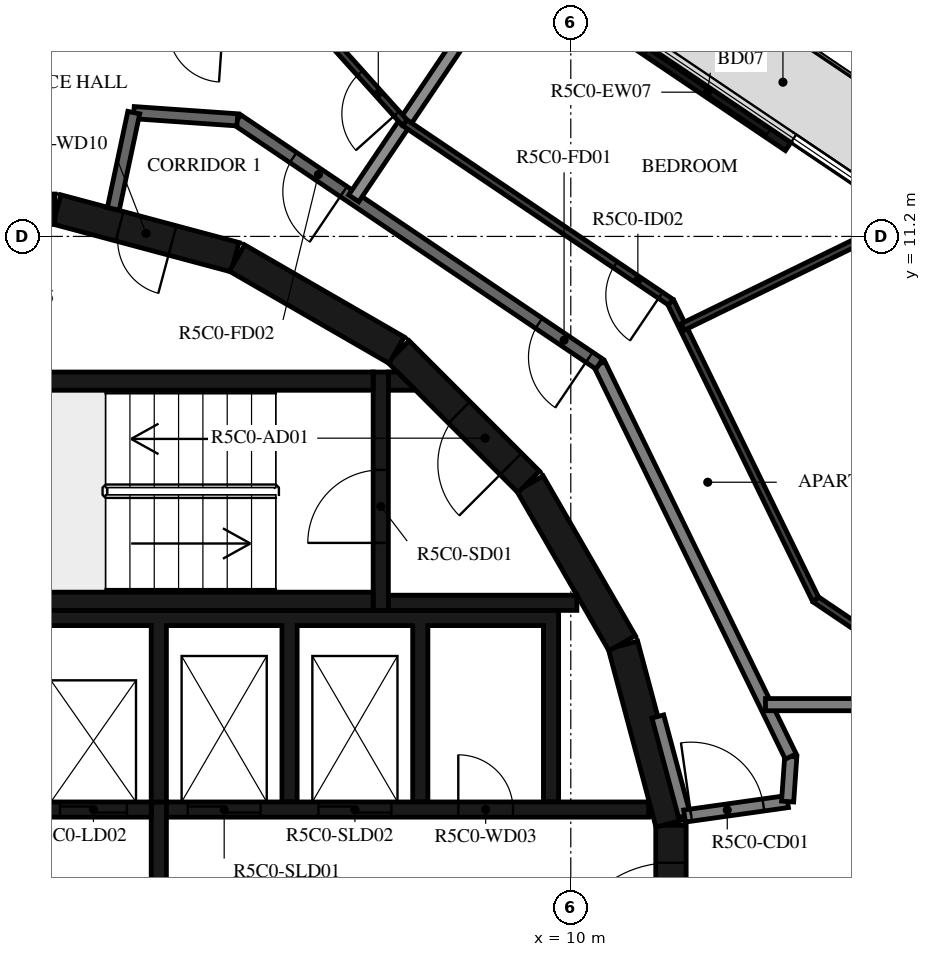
"""IFC4 building model, lengths in metres.
Left out: names, types, materials, properties, quantities, classifications, styles, units other than length and angle.
Written with IfcOpenShell. Run it as: python <this file> out.ifc"""

import sys

from ifc_helpers import new_model, si_unit, direction, frame, frame_2d, origin, place, context, subcontext, project, spatial, polyline, rectangle, outline, extrude, element, fill, save


model = new_model("IFC4")
c1 = context("Model", 3, precision=1e-05, world=origin(), true_north=direction((0.0, 1.0)))
c2 = subcontext(c1, "Body", "Model", "MODEL_VIEW")
j1 = project(units=[si_unit("LENGTHUNIT", "METRE"), si_unit("PLANEANGLEUNIT", "RADIAN")], contexts=[c1])
p1 = place(None, origin())
s1 = spatial("IfcSite", under=j1, at=p1, CompositionType="ELEMENT")
p2 = place(p1, origin())
s2 = spatial("IfcBuilding", under=s1, at=p2, CompositionType="ELEMENT")
p3 = place(p2, frame((0.0, 0.0, 209.4)))
s3 = spatial("IfcBuildingStorey", under=s2, at=p3, CompositionType="ELEMENT", Elevation=209.4)
p4 = place(p3, frame((13.574, 12.677, 0.0), z_axis=(0.0, 0.0, 1.0), x_axis=(-0.829068838882, 0.55914654644, 0.0)))
e1 = element("IfcWall", 1, at=p4, inside=s3, PredefinedType="STANDARD", context=c2, shape_type="SweptSolid", body=[
    extrude(rectangle(XDim=3.2, YDim=0.16, at=frame_2d((1.6, 0.0))), origin(), (0.0, 0.0, 1.0), 3.12),
])
p5 = place(p4, frame((0.4, 0.0, 0.0)))
e2 = element("IfcOpeningElement", 2, at=p5, cuts=e1, PredefinedType="OPENING", context=c2, shape_type="SweptSolid", body=[
    extrude(rectangle(XDim=2.4, YDim=2.4, at=frame_2d((1.2, 1.2))), frame((0.0, 0.09, 0.0), z_axis=(0.0, -1.0, 0.0), x_axis=(1.0, 0.0, 0.0)), (0.0, 0.0, 1.0), 0.18),
])
p6 = place(p3, frame((11.647, -1.516, 0.0), z_axis=(0.0, 0.0, 1.0), x_axis=(0.0, 1.0, 0.0)))
e3 = element("IfcWall", 3, at=p6, inside=s3, PredefinedType="SHEAR", context=c2, shape_type="SweptSolid", body=[
    extrude(rectangle(XDim=3.033, YDim=0.5, at=frame_2d((1.516, 0.0))), origin(), (0.0, 0.0, 1.0), 3.12),
])
p7 = place(p6, frame((0.616, 0.0, 0.0)))
e4 = element("IfcOpeningElement", 4, at=p7, cuts=e3, PredefinedType="OPENING", context=c2, shape_type="SweptSolid", body=[
    extrude(rectangle(XDim=1.8, YDim=2.1, at=frame_2d((0.9, 1.05))), frame((0.0, 0.26, 0.0), z_axis=(0.0, -1.0, 0.0), x_axis=(1.0, 0.0, 0.0)), (0.0, 0.0, 1.0), 0.52),
])
for number, where, z_axis, x_axis in (
    (5, (11.643, 1.55, 0.0), (0.0, 0.0, 1.0), (-0.259, 0.966, 0.0)),
    (6, (10.845, 4.51, 0.0), (0.0, 0.0, 1.0), (-0.5, 0.866, 0.0)),
):
    element("IfcWall", number, at=place(p3, frame(where, z_axis=z_axis, x_axis=x_axis)), inside=s3, PredefinedType="SHEAR", context=c2, shape_type="SweptSolid", body=[
        extrude(rectangle(XDim=3.033, YDim=0.5, at=frame_2d((1.516, 0.0))), origin(), (0.0, 0.0, 1.0), 3.12),
    ])
p8 = place(p3, frame((9.308, 7.164, 0.0), z_axis=(0.0, 0.0, 1.0), x_axis=(-0.707106781187, 0.707106781187, 0.0)))
e7 = element("IfcWall", 7, at=p8, inside=s3, PredefinedType="SHEAR", context=c2, shape_type="SweptSolid", body=[
    extrude(rectangle(XDim=3.032, YDim=0.5, at=frame_2d((1.516, 0.0))), origin(), (0.0, 0.0, 1.0), 3.12),
])
p9 = place(p8, frame((0.416, 0.0, 0.0)))
e8 = element("IfcOpeningElement", 8, at=p9, cuts=e7, PredefinedType="OPENING", context=c2, shape_type="SweptSolid", body=[
    extrude(rectangle(XDim=1.2, YDim=2.1, at=frame_2d((0.6, 1.05))), frame((0.0, 0.26, 0.0), z_axis=(0.0, -1.0, 0.0), x_axis=(1.0, 0.0, 0.0)), (0.0, 0.0, 1.0), 0.52),
])
p10 = place(p3, frame((7.137, 9.329, 0.0), z_axis=(0.0, 0.0, 1.0), x_axis=(-0.865975092491, 0.500087131594, 0.0)))
e9 = element("IfcWall", 9, at=p10, inside=s3, PredefinedType="SHEAR", context=c2, shape_type="SweptSolid", body=[
    extrude(rectangle(XDim=3.033, YDim=0.5, at=frame_2d((1.516, 0.0))), origin(), (0.0, 0.0, 1.0), 3.12),
])
p11 = place(p3, frame((4.479, 10.858, 0.0), z_axis=(0.0, 0.0, 1.0), x_axis=(-0.965948410781, 0.258734743916, 0.0)))
e10 = element("IfcWall", 10, at=p11, inside=s3, PredefinedType="SHEAR", context=c2, shape_type="SweptSolid", body=[
    extrude(rectangle(XDim=3.033, YDim=0.5, at=frame_2d((1.516, 0.0))), origin(), (0.0, 0.0, 1.0), 3.12),
])
p12 = place(p11, frame((1.066, 0.0, 0.0)))
e11 = element("IfcOpeningElement", 11, at=p12, cuts=e10, PredefinedType="OPENING", context=c2, shape_type="SweptSolid", body=[
    extrude(rectangle(XDim=0.9, YDim=2.1, at=frame_2d((0.45, 1.05))), frame((0.0, 0.26, 0.0), z_axis=(0.0, -1.0, 0.0), x_axis=(1.0, 0.0, 0.0)), (0.0, 0.0, 1.0), 0.52),
])
p13 = place(p3, frame((1.516, 11.647, 0.0), z_axis=(0.0, 0.0, 1.0), x_axis=(-1.0, 0.0, 0.0)))
e12 = element("IfcWall", 12, at=p13, inside=s3, PredefinedType="SHEAR", context=c2, shape_type="SweptSolid", body=[
    extrude(rectangle(XDim=3.033, YDim=0.5, at=frame_2d((1.516, 0.0))), origin(), (0.0, 0.0, 1.0), 3.12),
])
for number, where, z_axis, x_axis in (
    (13, (0.0, 5.2, 0.0), (0.0, 0.0, 1.0), (1.0, 0.0, 0.0)),
    (14, (0.0, 8.82, 0.0), (0.0, 0.0, 1.0), (1.0, 0.0, 0.0)),
):
    element("IfcWall", number, at=place(p3, frame(where, z_axis=z_axis, x_axis=x_axis)), inside=s3, PredefinedType="SHEAR", context=c2, shape_type="SweptSolid", body=[
        extrude(rectangle(XDim=6.75, YDim=0.3, at=frame_2d((3.375, 0.0))), origin(), (0.0, 0.0, 1.0), 3.12),
    ])
p14 = place(p3, frame((6.875, 5.05, 0.0), z_axis=(0.0, 0.0, 1.0), x_axis=(0.0, 1.0, 0.0)))
e15 = element("IfcWall", 15, at=p14, inside=s3, PredefinedType="SHEAR", context=c2, shape_type="SweptSolid", body=[
    extrude(rectangle(XDim=3.92, YDim=0.25, at=frame_2d((1.96, 0.0))), origin(), (0.0, 0.0, 1.0), 3.12),
])
p15 = place(p14, frame((1.11, 0.0, 0.0)))
e16 = element("IfcOpeningElement", 16, at=p15, cuts=e15, PredefinedType="OPENING", context=c2, shape_type="SweptSolid", body=[
    extrude(rectangle(XDim=1.2, YDim=2.1, at=frame_2d((0.6, 1.05))), frame((0.0, 0.135, 0.0), z_axis=(0.0, -1.0, 0.0), x_axis=(1.0, 0.0, 0.0)), (0.0, 0.0, 1.0), 0.27),
])
p16 = place(p3, frame((7.0, 5.175, 0.0), z_axis=(0.0, 0.0, 1.0), x_axis=(1.0, 0.0, 0.0)))
e17 = element("IfcWall", 17, at=p16, inside=s3, PredefinedType="SHEAR", context=c2, shape_type="SweptSolid", body=[
    extrude(rectangle(XDim=3.1, YDim=0.25, at=frame_2d((1.55, 0.0))), origin(), (0.0, 0.0, 1.0), 3.12),
])
p17 = place(p3, origin())
e18 = element("IfcWall", 18, at=p17, inside=s3, PredefinedType="SHEAR", context=c2, shape_type="SweptSolid", body=[
    extrude(outline(polyline([(7.448, 8.67), (7.0, 8.67), (7.0, 8.97), (7.148, 8.97), (7.448, 8.67)])), origin(), (0.0, 0.0, 1.0), 3.12),
])
p18 = place(p3, origin())
e19 = element("IfcWall", 19, at=p18, inside=s3, PredefinedType="SHEAR", context=c2, shape_type="SweptSolid", body=[
    extrude(outline(polyline([(-9.55, 4.8), (-5.5, 4.8), (-5.5, 1.9), (-5.25, 1.9), (-5.25, 4.8), (-1.2, 4.8), (-1.2, 1.9), (-0.95, 1.9), (-0.95, 4.8), (0.95, 4.8), (0.95, 1.9), (1.2, 1.9), (1.2, 4.8), (3.1, 4.8), (3.1, 1.9), (3.35, 1.9), (3.35, 4.8), (5.25, 4.8), (5.25, 1.9), (5.5, 1.9), (5.5, 4.8), (7.4, 4.8), (7.4, 1.9), (7.65, 1.9), (7.65, 4.8), (9.55, 4.8), (9.55, 1.9), (9.8, 1.9), (9.8, 4.8), (9.8, 5.05), (-9.8, 5.05), (-9.8, 4.8), (-9.8, 1.9), (-9.55, 1.9), (-9.55, 4.8)])), origin(), (0.0, 0.0, 1.0), 3.12),
])
p19 = place(p3, frame((-11.28, 1.775, 0.0), z_axis=(0.0, 0.0, 1.0), x_axis=(1.0, 0.0, 0.0)))
e20 = element("IfcWall", 20, at=p19, inside=s3, PredefinedType="SHEAR", context=c2, shape_type="SweptSolid", body=[
    extrude(rectangle(XDim=14.38, YDim=0.25, at=frame_2d((7.19, 0.0))), origin(), (0.0, 0.0, 1.0), 3.12),
])
p20 = place(p19, frame((10.73, 0.0, 0.0)))
e21 = element("IfcOpeningElement", 21, at=p20, cuts=e20, PredefinedType="OPENING", context=c2, shape_type="SweptSolid", body=[
    extrude(rectangle(XDim=1.1, YDim=2.1, at=frame_2d((0.55, 1.05))), frame((0.0, 0.135, 0.0), z_axis=(0.0, -1.0, 0.0), x_axis=(1.0, 0.0, 0.0)), (0.0, 0.0, 1.0), 0.27),
])
p21 = place(p19, frame((12.88, 0.0, 0.0)))
e22 = element("IfcOpeningElement", 22, at=p21, cuts=e20, PredefinedType="OPENING", context=c2, shape_type="SweptSolid", body=[
    extrude(rectangle(XDim=1.1, YDim=2.1, at=frame_2d((0.55, 1.05))), frame((0.0, 0.135, 0.0), z_axis=(0.0, -1.0, 0.0), x_axis=(1.0, 0.0, 0.0)), (0.0, 0.0, 1.0), 0.27),
])
p22 = place(p19, frame((3.305, 0.0, 0.0)))
e23 = element("IfcOpeningElement", 23, at=p22, cuts=e20, PredefinedType="OPENING", context=c2, shape_type="SweptSolid", body=[
    extrude(rectangle(XDim=0.9, YDim=2.1, at=frame_2d((0.45, 1.05))), frame((0.0, 0.135, 0.0), z_axis=(0.0, -1.0, 0.0), x_axis=(1.0, 0.0, 0.0)), (0.0, 0.0, 1.0), 0.27),
])
p23 = place(p19, frame((7.605, 0.0, 0.0)))
e24 = element("IfcOpeningElement", 24, at=p23, cuts=e20, PredefinedType="OPENING", context=c2, shape_type="SweptSolid", body=[
    extrude(rectangle(XDim=0.9, YDim=2.1, at=frame_2d((0.45, 1.05))), frame((0.0, 0.135, 0.0), z_axis=(0.0, -1.0, 0.0), x_axis=(1.0, 0.0, 0.0)), (0.0, 0.0, 1.0), 0.27),
])
p24 = place(p3, frame((3.35, 1.775, 0.0), z_axis=(0.0, 0.0, 1.0), x_axis=(1.0, 0.0, 0.0)))
e25 = element("IfcWall", 25, at=p24, inside=s3, PredefinedType="SHEAR", context=c2, shape_type="SweptSolid", body=[
    extrude(rectangle(XDim=7.93, YDim=0.25, at=frame_2d((3.965, 0.0))), origin(), (0.0, 0.0, 1.0), 3.12),
])
p25 = place(p24, frame((0.35, 0.0, 0.0)))
e26 = element("IfcOpeningElement", 26, at=p25, cuts=e25, PredefinedType="OPENING", context=c2, shape_type="SweptSolid", body=[
    extrude(rectangle(XDim=1.2, YDim=2.4, at=frame_2d((0.6, 1.2))), frame((0.0, 0.135, 0.0), z_axis=(0.0, -1.0, 0.0), x_axis=(1.0, 0.0, 0.0)), (0.0, 0.0, 1.0), 0.27),
])
p26 = place(p24, frame((2.5, 0.0, 0.0)))
e27 = element("IfcOpeningElement", 27, at=p26, cuts=e25, PredefinedType="OPENING", context=c2, shape_type="SweptSolid", body=[
    extrude(rectangle(XDim=1.2, YDim=2.4, at=frame_2d((0.6, 1.2))), frame((0.0, 0.135, 0.0), z_axis=(0.0, -1.0, 0.0), x_axis=(1.0, 0.0, 0.0)), (0.0, 0.0, 1.0), 0.27),
])
p27 = place(p24, frame((4.8, 0.0, 0.0)))
e28 = element("IfcOpeningElement", 28, at=p27, cuts=e25, PredefinedType="OPENING", context=c2, shape_type="SweptSolid", body=[
    extrude(rectangle(XDim=0.9, YDim=2.1, at=frame_2d((0.45, 1.05))), frame((0.0, 0.135, 0.0), z_axis=(0.0, -1.0, 0.0), x_axis=(1.0, 0.0, 0.0)), (0.0, 0.0, 1.0), 0.27),
])
p28 = place(p3, frame((3.225, -1.9, 0.0), z_axis=(0.0, 0.0, 1.0), x_axis=(0.0, 1.0, 0.0)))
e29 = element("IfcWall", 29, at=p28, inside=s3, PredefinedType="SHEAR", context=c2, shape_type="SweptSolid", body=[
    extrude(rectangle(XDim=3.8, YDim=0.25, at=frame_2d((1.9, 0.0))), origin(), (0.0, 0.0, 1.0), 3.12),
])
p29 = place(p3, frame((11.87, 1.668, 0.0), z_axis=(0.0, 0.0, 1.0), x_axis=(-0.258836880648, 0.965921047093, 0.0)))
e30 = element("IfcWall", 30, at=p29, inside=s3, PredefinedType="STANDARD", context=c2, shape_type="SweptSolid", body=[
    extrude(rectangle(XDim=1.695, YDim=0.2, at=frame_2d((0.848, 0.0))), origin(), (0.0, 0.0, 1.0), 3.12),
])
p30 = place(p3, frame((11.87, 1.668, 0.0), z_axis=(0.0, 0.0, 1.0), x_axis=(0.990271931984, 0.139145609792, 0.0)))
e31 = element("IfcWall", 31, at=p30, inside=s3, PredefinedType="STANDARD", context=c2, shape_type="SweptSolid", body=[
    extrude(rectangle(XDim=1.712, YDim=0.2, at=frame_2d((0.856, 0.0))), origin(), (0.0, 0.0, 1.0), 3.12),
])
p31 = place(p30, frame((0.11, 0.0, 0.0)))
e32 = element("IfcOpeningElement", 32, at=p31, cuts=e31, PredefinedType="OPENING", context=c2, shape_type="SweptSolid", body=[
    extrude(rectangle(XDim=1.2, YDim=2.1, at=frame_2d((0.6, 1.05))), frame((0.0, 0.11, 0.0), z_axis=(0.0, -1.0, 0.0), x_axis=(1.0, 0.0, 0.0)), (0.0, 0.0, 1.0), 0.22),
])
p32 = place(p3, frame((13.566, 1.906, 0.0), z_axis=(0.0, 0.0, 1.0), x_axis=(0.07005495793, 0.997543133338, 0.0)))
e33 = element("IfcWall", 33, at=p32, inside=s3, PredefinedType="STANDARD", context=c2, shape_type="SweptSolid", body=[
    extrude(rectangle(XDim=0.742, YDim=0.2, at=frame_2d((0.371, 0.0))), origin(), (0.0, 0.0, 1.0), 3.12),
])
p33 = place(p3, frame((13.618, 2.647, 0.0), z_axis=(0.0, 0.0, 1.0), x_axis=(-0.438366026218, 0.898796543751, 0.0)))
e34 = element("IfcWall", 34, at=p33, inside=s3, PredefinedType="STANDARD", context=c2, shape_type="SweptSolid", body=[
    extrude(rectangle(XDim=7.181, YDim=0.2, at=frame_2d((3.591, 0.0))), origin(), (0.0, 0.0, 1.0), 3.12),
])
p34 = place(p3, frame((10.47, 9.101, 0.0), z_axis=(0.0, 0.0, 1.0), x_axis=(-0.829035841718, 0.559195469534, 0.0)))
e35 = element("IfcWall", 35, at=p34, inside=s3, PredefinedType="STANDARD", context=c2, shape_type="SweptSolid", body=[
    extrude(rectangle(XDim=7.181, YDim=0.2, at=frame_2d((3.591, 0.0))), origin(), (0.0, 0.0, 1.0), 3.12),
])
p35 = place(p34, frame((0.2, 0.0, 0.0)))
e36 = element("IfcOpeningElement", 36, at=p35, cuts=e35, PredefinedType="OPENING", context=c2, shape_type="SweptSolid", body=[
    extrude(rectangle(XDim=1.0, YDim=2.1, at=frame_2d((0.5, 1.05))), frame((0.0, 0.11, 0.0), z_axis=(0.0, -1.0, 0.0), x_axis=(1.0, 0.0, 0.0)), (0.0, 0.0, 1.0), 0.22),
])
p36 = place(p34, frame((5.073, 0.0, 0.0)))
e37 = element("IfcOpeningElement", 37, at=p36, cuts=e35, PredefinedType="OPENING", context=c2, shape_type="SweptSolid", body=[
    extrude(rectangle(XDim=1.0, YDim=2.1, at=frame_2d((0.5, 1.05))), frame((0.0, 0.11, 0.0), z_axis=(0.0, -1.0, 0.0), x_axis=(1.0, 0.0, 0.0)), (0.0, 0.0, 1.0), 0.22),
])
p37 = place(p3, frame((4.517, 13.117, 0.0), z_axis=(0.0, 0.0, 1.0), x_axis=(-0.997562153664, 0.069783591025, 0.0)))
e38 = element("IfcWall", 38, at=p37, inside=s3, PredefinedType="STANDARD", context=c2, shape_type="SweptSolid", body=[
    extrude(rectangle(XDim=1.707, YDim=0.2, at=frame_2d((0.854, 0.0))), origin(), (0.0, 0.0, 1.0), 3.12),
])
p38 = place(p3, frame((2.813, 13.236, 0.0), z_axis=(0.0, 0.0, 1.0), x_axis=(-0.207911086063, -0.978147729278, 0.0)))
e39 = element("IfcWall", 39, at=p38, inside=s3, PredefinedType="STANDARD", context=c2, shape_type="SweptSolid", body=[
    extrude(rectangle(XDim=1.618, YDim=0.2, at=frame_2d((0.809, 0.0))), origin(), (0.0, 0.0, 1.0), 3.12),
])
p39 = place(p3, frame((17.9, 3.5, 0.0), z_axis=(0.0, 0.0, 1.0), x_axis=(-1.0, 0.0, 0.0)))
e40 = element("IfcWall", 40, at=p39, inside=s3, PredefinedType="STANDARD", context=c2, shape_type="SweptSolid", body=[
    extrude(rectangle(XDim=4.698, YDim=0.2, at=frame_2d((2.349, 0.0))), origin(), (0.0, 0.0, 1.0), 3.12),
])
p40 = place(p3, frame((9.104, 15.79, 0.0), z_axis=(0.0, 0.0, 1.0), x_axis=(-0.559193912135, -0.829036892201, 0.0)))
e41 = element("IfcWall", 41, at=p40, inside=s3, PredefinedType="STANDARD", context=c2, shape_type="SweptSolid", body=[
    extrude(rectangle(XDim=4.781, YDim=0.2, at=frame_2d((2.39, 0.0))), origin(), (0.0, 0.0, 1.0), 2.73),
])
p41 = place(p3, frame((14.654, 4.808, 0.0), z_axis=(0.0, 0.0, 1.0), x_axis=(-0.829065184024, 0.559151965604, 0.0)))
e42 = element("IfcWall", 42, at=p41, inside=s3, PredefinedType="PARTITIONING", context=c2, shape_type="SweptSolid", body=[
    extrude(rectangle(XDim=0.758, YDim=0.12, at=frame_2d((0.379, 0.0))), origin(), (0.0, 0.0, 1.0), 3.12),
])
p42 = place(p3, frame((14.026, 5.232, 0.0), z_axis=(0.0, 0.0, 1.0), x_axis=(-0.438374985284, 0.89879217413, 0.0)))
e43 = element("IfcWall", 43, at=p42, inside=s3, PredefinedType="PARTITIONING", context=c2, shape_type="SweptSolid", body=[
    extrude(rectangle(XDim=5.438, YDim=0.12, at=frame_2d((2.719, 0.0))), origin(), (0.0, 0.0, 1.0), 3.12),
])
p43 = place(p3, frame((11.642, 10.12, 0.0), z_axis=(0.0, 0.0, 1.0), x_axis=(-0.829054664054, 0.559167563446, 0.0)))
e44 = element("IfcWall", 44, at=p43, inside=s3, PredefinedType="PARTITIONING", context=c2, shape_type="SweptSolid", body=[
    extrude(rectangle(XDim=5.275, YDim=0.12, at=frame_2d((2.637, 0.0))), origin(), (0.0, 0.0, 1.0), 3.12),
])
p44 = place(p43, frame((0.2, 0.0, 0.0)))
e45 = element("IfcOpeningElement", 45, at=p44, cuts=e44, PredefinedType="OPENING", context=c2, shape_type="SweptSolid", body=[
    extrude(rectangle(XDim=0.9, YDim=2.1, at=frame_2d((0.45, 1.05))), frame((0.0, 0.07, 0.0), z_axis=(0.0, -1.0, 0.0), x_axis=(1.0, 0.0, 0.0)), (0.0, 0.0, 1.0), 0.14),
])
p45 = place(p3, frame((15.482, 11.487, 0.0), z_axis=(0.0, 0.0, 1.0), x_axis=(-0.898807251285, -0.438344071521, 0.0)))
e46 = element("IfcWall", 46, at=p45, inside=s3, PredefinedType="PARTITIONING", context=c2, shape_type="SweptSolid", body=[
    extrude(rectangle(XDim=4.051, YDim=0.12, at=frame_2d((2.025, 0.0))), origin(), (0.0, 0.0, 1.0), 3.12),
])
p46 = place(p3, frame((7.269, 13.07, 0.0), z_axis=(0.0, 0.0, 1.0), x_axis=(-0.668495993587, 0.743715743116, 0.0)))
e47 = element("IfcWall", 47, at=p46, inside=s3, PredefinedType="PARTITIONING", context=c2, shape_type="SweptSolid", body=[
    extrude(rectangle(XDim=3.281, YDim=0.12, at=frame_2d((1.641, 0.0))), origin(), (0.0, 0.0, 1.0), 3.12),
])
p47 = place(p46, frame((0.2, 0.0, 0.0)))
e48 = element("IfcOpeningElement", 48, at=p47, cuts=e47, PredefinedType="OPENING", context=c2, shape_type="SweptSolid", body=[
    extrude(rectangle(XDim=0.9, YDim=2.1, at=frame_2d((0.45, 1.05))), frame((0.0, 0.07, 0.0), z_axis=(0.0, -1.0, 0.0), x_axis=(1.0, 0.0, 0.0)), (0.0, 0.0, 1.0), 0.14),
])
p48 = place(p5, origin())
e49 = element("IfcDoor", 49, at=p48, inside=s3, OperationType="DOUBLE_DOOR_SLIDING", PredefinedType="DOOR", context=c2, shape_type="SweptSolid", body=[
    extrude(rectangle(XDim=2.4, YDim=2.4, at=frame_2d((1.2, 1.2))), frame((0.0, 0.025, 0.0), z_axis=(0.0, -1.0, 0.0), x_axis=(1.0, 0.0, 0.0)), (0.0, 0.0, 1.0), 0.05),
])
fill(e2, e49)
p49 = place(p15, origin())
e50 = element("IfcDoor", 50, at=p49, inside=s3, OperationType="SINGLE_SWING_LEFT", PredefinedType="DOOR", context=c2, shape_type="SweptSolid", body=[
    extrude(rectangle(XDim=1.2, YDim=2.1, at=frame_2d((0.6, 1.05))), frame((0.0, 0.025, 0.0), z_axis=(0.0, -1.0, 0.0), x_axis=(1.0, 0.0, 0.0)), (0.0, 0.0, 1.0), 0.05),
])
fill(e16, e50)
p50 = place(p9, origin())
e51 = element("IfcDoor", 51, at=p50, inside=s3, OperationType="SINGLE_SWING_RIGHT", PredefinedType="DOOR", context=c2, shape_type="SweptSolid", body=[
    extrude(rectangle(XDim=1.2, YDim=2.1, at=frame_2d((0.6, 1.05))), frame((0.0, 0.025, 0.0), z_axis=(0.0, -1.0, 0.0), x_axis=(1.0, 0.0, 0.0)), (0.0, 0.0, 1.0), 0.05),
])
fill(e8, e51)
p51 = place(p7, origin())
e52 = element("IfcDoor", 52, at=p51, inside=s3, OperationType="DOUBLE_DOOR_SINGLE_SWING", PredefinedType="DOOR", context=c2, shape_type="SweptSolid", body=[
    extrude(rectangle(XDim=1.8, YDim=2.1, at=frame_2d((0.9, 1.05))), frame((0.0, 0.025, 0.0), z_axis=(0.0, -1.0, 0.0), x_axis=(1.0, 0.0, 0.0)), (0.0, 0.0, 1.0), 0.05),
])
fill(e4, e52)
p52 = place(p21, origin())
e53 = element("IfcDoor", 53, at=p52, inside=s3, OperationType="DOUBLE_DOOR_SLIDING", PredefinedType="DOOR", context=c2, shape_type="SweptSolid", body=[
    extrude(rectangle(XDim=1.1, YDim=2.1, at=frame_2d((0.55, 1.05))), frame((0.0, 0.025, 0.0), z_axis=(0.0, -1.0, 0.0), x_axis=(1.0, 0.0, 0.0)), (0.0, 0.0, 1.0), 0.05),
])
fill(e22, e53)
p53 = place(p25, origin())
e54 = element("IfcDoor", 54, at=p53, inside=s3, OperationType="DOUBLE_DOOR_SLIDING", PredefinedType="DOOR", context=c2, shape_type="SweptSolid", body=[
    extrude(rectangle(XDim=1.2, YDim=2.4, at=frame_2d((0.6, 1.2))), frame((0.0, 0.025, 0.0), z_axis=(0.0, -1.0, 0.0), x_axis=(1.0, 0.0, 0.0)), (0.0, 0.0, 1.0), 0.05),
])
fill(e26, e54)
p54 = place(p26, origin())
e55 = element("IfcDoor", 55, at=p54, inside=s3, OperationType="DOUBLE_DOOR_SLIDING", PredefinedType="DOOR", context=c2, shape_type="SweptSolid", body=[
    extrude(rectangle(XDim=1.2, YDim=2.4, at=frame_2d((0.6, 1.2))), frame((0.0, 0.025, 0.0), z_axis=(0.0, -1.0, 0.0), x_axis=(1.0, 0.0, 0.0)), (0.0, 0.0, 1.0), 0.05),
])
fill(e27, e55)
p55 = place(p27, origin())
e56 = element("IfcDoor", 56, at=p55, inside=s3, OperationType="SINGLE_SWING_LEFT", PredefinedType="DOOR", context=c2, shape_type="SweptSolid", body=[
    extrude(rectangle(XDim=0.9, YDim=2.1, at=frame_2d((0.45, 1.05))), frame((0.0, 0.025, 0.0), z_axis=(0.0, -1.0, 0.0), x_axis=(1.0, 0.0, 0.0)), (0.0, 0.0, 1.0), 0.05),
])
fill(e28, e56)
p56 = place(p12, origin())
e57 = element("IfcDoor", 57, at=p56, inside=s3, OperationType="SINGLE_SWING_RIGHT", PredefinedType="DOOR", context=c2, shape_type="SweptSolid", body=[
    extrude(rectangle(XDim=0.9, YDim=2.1, at=frame_2d((0.45, 1.05))), frame((0.0, 0.025, 0.0), z_axis=(0.0, -1.0, 0.0), x_axis=(1.0, 0.0, 0.0)), (0.0, 0.0, 1.0), 0.05),
])
fill(e11, e57)
p57 = place(p35, origin())
e58 = element("IfcDoor", 58, at=p57, inside=s3, OperationType="SINGLE_SWING_LEFT", PredefinedType="DOOR", context=c2, shape_type="SweptSolid", body=[
    extrude(rectangle(XDim=1.0, YDim=2.1, at=frame_2d((0.5, 1.05))), frame((0.0, 0.025, 0.0), z_axis=(0.0, -1.0, 0.0), x_axis=(1.0, 0.0, 0.0)), (0.0, 0.0, 1.0), 0.05),
])
fill(e36, e58)
p58 = place(p44, origin())
e59 = element("IfcDoor", 59, at=p58, inside=s3, OperationType="SINGLE_SWING_LEFT", PredefinedType="DOOR", context=c2, shape_type="SweptSolid", body=[
    extrude(rectangle(XDim=0.9, YDim=2.1, at=frame_2d((0.45, 1.05))), frame((0.0, 0.025, 0.0), z_axis=(0.0, -1.0, 0.0), x_axis=(1.0, 0.0, 0.0)), (0.0, 0.0, 1.0), 0.05),
])
fill(e45, e59)
p59 = place(p36, origin())
e60 = element("IfcDoor", 60, at=p59, inside=s3, OperationType="SINGLE_SWING_RIGHT", PredefinedType="DOOR", context=c2, shape_type="SweptSolid", body=[
    extrude(rectangle(XDim=1.0, YDim=2.1, at=frame_2d((0.5, 1.05))), frame((0.0, 0.025, 0.0), z_axis=(0.0, -1.0, 0.0), x_axis=(1.0, 0.0, 0.0)), (0.0, 0.0, 1.0), 0.05),
])
fill(e37, e60)
p60 = place(p47, origin())
e61 = element("IfcDoor", 61, at=p60, inside=s3, OperationType="SINGLE_SWING_RIGHT", PredefinedType="DOOR", context=c2, shape_type="SweptSolid", body=[
    extrude(rectangle(XDim=0.9, YDim=2.1, at=frame_2d((0.45, 1.05))), frame((0.0, 0.025, 0.0), z_axis=(0.0, -1.0, 0.0), x_axis=(1.0, 0.0, 0.0)), (0.0, 0.0, 1.0), 0.05),
])
fill(e48, e61)
p61 = place(p31, origin())
e62 = element("IfcDoor", 62, at=p61, inside=s3, OperationType="DOUBLE_DOOR_SINGLE_SWING", PredefinedType="DOOR", context=c2, shape_type="SweptSolid", body=[
    extrude(rectangle(XDim=1.2, YDim=2.1, at=frame_2d((0.6, 1.05))), frame((0.0, 0.025, 0.0), z_axis=(0.0, -1.0, 0.0), x_axis=(1.0, 0.0, 0.0)), (0.0, 0.0, 1.0), 0.05),
])
fill(e32, e62)
save(model, sys.argv[1])
